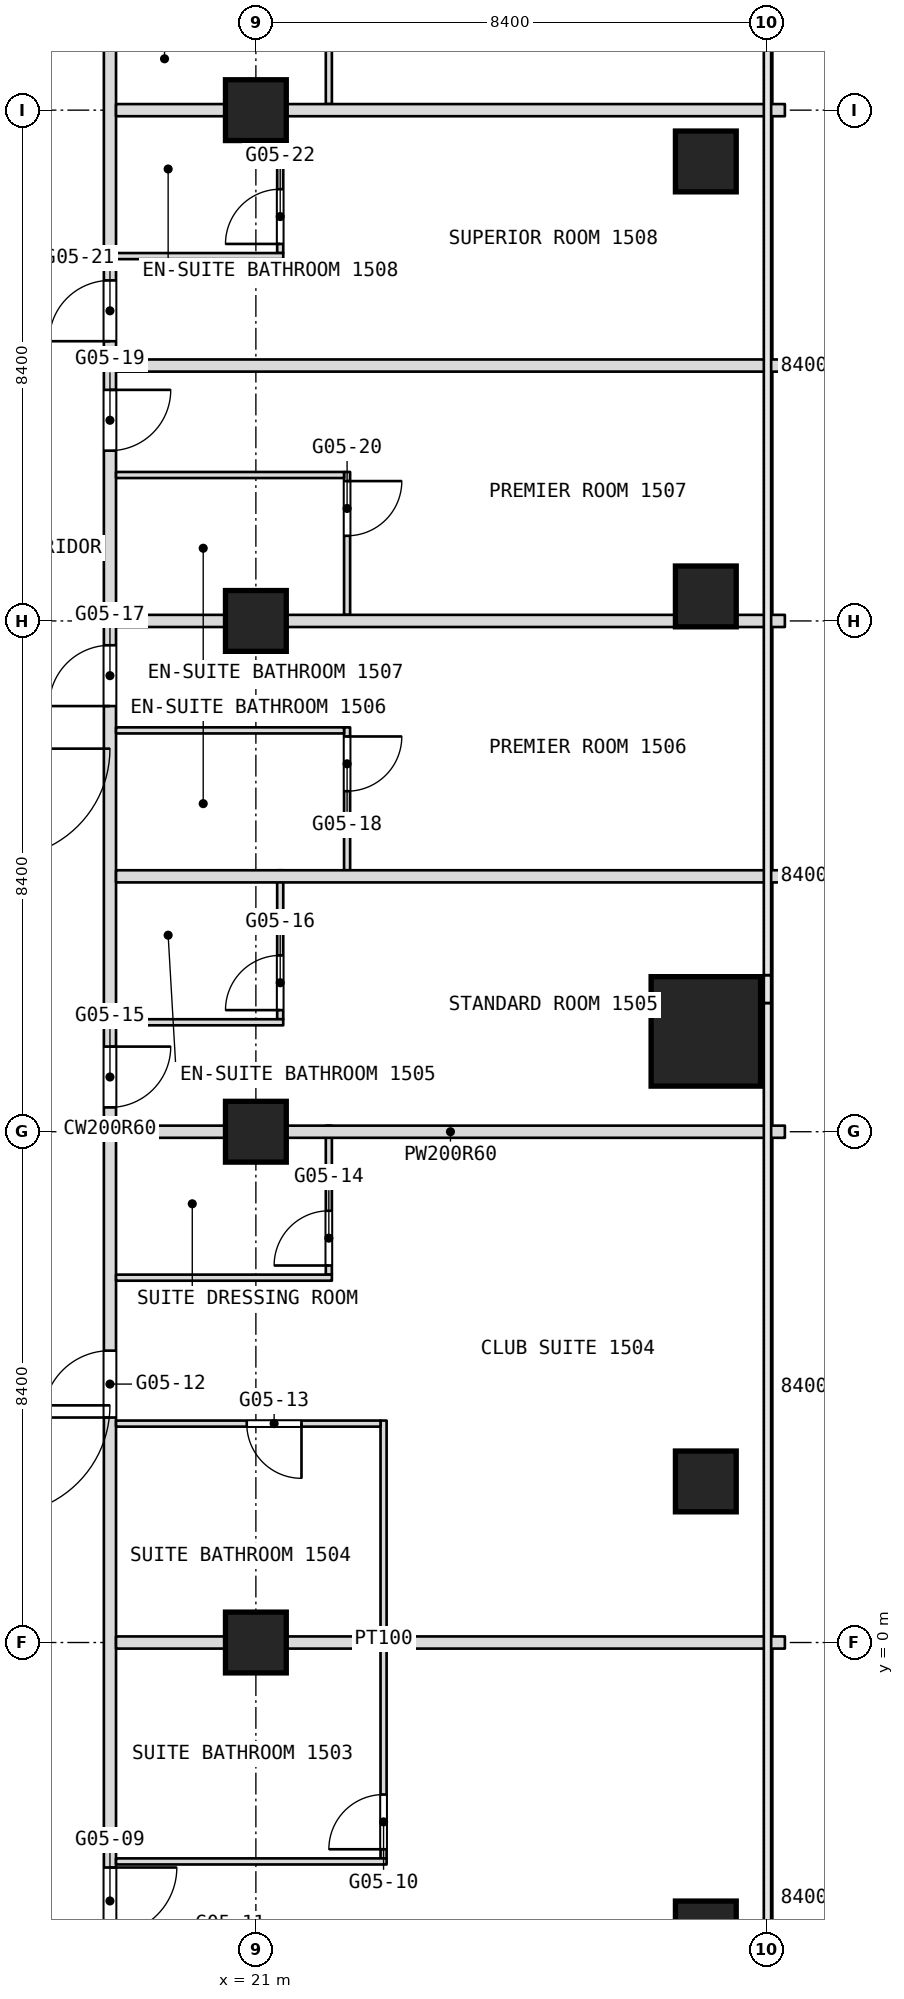
"""IFC4 building model, lengths in metres.
Left out: names, types, materials, properties, quantities, classifications, styles, units other than length and angle.
Written with IfcOpenShell. Run it as: python <this file> out.ifc"""

import sys

from ifc_helpers import new_model, si_unit, direction, frame, frame_2d, origin, origin_2d, place, context, subcontext, project, spatial, rectangle, extrude, element, fill, save


model = new_model("IFC4")
c1 = context("Model", 3, precision=1e-05, world=origin(), true_north=direction((0.0, 1.0)))
c2 = subcontext(c1, "Body", "Model", "MODEL_VIEW")
j1 = project(units=[si_unit("LENGTHUNIT", "METRE"), si_unit("PLANEANGLEUNIT", "RADIAN")], contexts=[c1])
p1 = place(None, origin())
s1 = spatial("IfcSite", under=j1, at=p1, CompositionType="ELEMENT")
p2 = place(p1, origin())
s2 = spatial("IfcBuilding", under=s1, at=p2, CompositionType="ELEMENT")
p3 = place(p2, frame((0.0, 0.0, 68.9)))
s3 = spatial("IfcBuildingStorey", under=s2, at=p3, CompositionType="ELEMENT", Elevation=68.9)
p4 = place(p3, frame((28.4, 10.05, 0.0), z_axis=(0.0, 0.0, 1.0), x_axis=(1.0, 0.0, 0.0)))
e1 = element("IfcColumn", 1, at=p4, inside=s3, PredefinedType="COLUMN", context=c2, shape_type="SweptSolid", body=[
    extrude(rectangle(XDim=1.8, YDim=1.8, at=origin_2d()), origin(), (0.0, 0.0, 1.0), 3.6),
])
for number, where, z_axis, x_axis in (
    (2, (21.0, 0.0, 0.0), (0.0, 0.0, 1.0), (1.0, 0.0, 0.0)),
    (3, (21.0, 8.4, 0.0), (0.0, 0.0, 1.0), (1.0, 0.0, 0.0)),
    (4, (21.0, 16.8, 0.0), (0.0, 0.0, 1.0), (1.0, 0.0, 0.0)),
    (5, (21.0, 25.2, 0.0), (0.0, 0.0, 1.0), (1.0, 0.0, 0.0)),
    (6, (28.4, 24.356, 0.0), (0.0, 0.0, 1.0), (1.0, 0.0, 0.0)),
    (7, (28.4, 17.203, 0.0), (0.0, 0.0, 1.0), (1.0, 0.0, 0.0)),
    (8, (28.4, 2.649, 0.0), (0.0, 0.0, 1.0), (1.0, 0.0, 0.0)),
    (9, (28.4, -4.752, 0.0), (0.0, 0.0, 1.0), (1.0, 0.0, 0.0)),
):
    element("IfcColumn", number, at=place(p3, frame(where, z_axis=z_axis, x_axis=x_axis)), inside=s3, PredefinedType="COLUMN", context=c2, shape_type="SweptSolid", body=[
        extrude(rectangle(XDim=1.0, YDim=1.0, at=origin_2d()), origin(), (0.0, 0.0, 1.0), 3.6),
    ])
p5 = place(p3, frame((23.1, -3.55, 0.0), z_axis=(0.0, 0.0, 1.0), x_axis=(0.0, 1.0, 0.0)))
e10 = element("IfcWall", 10, at=p5, inside=s3, PredefinedType="PARTITIONING", context=c2, shape_type="SweptSolid", body=[
    extrude(rectangle(XDim=7.2, YDim=0.1, at=frame_2d((3.6, 0.0))), origin(), (0.0, 0.0, 1.0), 3.34),
])
p6 = place(p5, frame((0.15, 0.0, 0.0)))
e11 = element("IfcOpeningElement", 11, at=p6, cuts=e10, PredefinedType="OPENING", context=c2, shape_type="SweptSolid", body=[
    extrude(rectangle(XDim=0.9, YDim=2.1, at=frame_2d((0.45, 1.05))), frame((0.0, 0.05, 0.0), z_axis=(0.0, -1.0, 0.0), x_axis=(1.0, 0.0, 0.0)), (0.0, 0.0, 1.0), 0.1),
])
p7 = place(p3, frame((22.5, 12.7, 0.0), z_axis=(0.0, 0.0, 1.0), x_axis=(0.0, 1.0, 0.0)))
e12 = element("IfcWall", 12, at=p7, inside=s3, PredefinedType="PARTITIONING", context=c2, shape_type="SweptSolid", body=[
    extrude(rectangle(XDim=2.35, YDim=0.1, at=frame_2d((1.175, 0.0))), origin(), (0.0, 0.0, 1.0), 3.34),
])
p8 = place(p7, frame((1.3, 0.0, 0.0)))
e13 = element("IfcOpeningElement", 13, at=p8, cuts=e12, PredefinedType="OPENING", context=c2, shape_type="SweptSolid", body=[
    extrude(rectangle(XDim=0.9, YDim=2.1, at=frame_2d((0.45, 1.05))), frame((0.0, 0.05, 0.0), z_axis=(0.0, -1.0, 0.0), x_axis=(1.0, 0.0, 0.0)), (0.0, 0.0, 1.0), 0.1),
])
p9 = place(p3, frame((22.5, 16.9, 0.0), z_axis=(0.0, 0.0, 1.0), x_axis=(0.0, 1.0, 0.0)))
e14 = element("IfcWall", 14, at=p9, inside=s3, PredefinedType="PARTITIONING", context=c2, shape_type="SweptSolid", body=[
    extrude(rectangle(XDim=2.35, YDim=0.1, at=frame_2d((1.175, 0.0))), origin(), (0.0, 0.0, 1.0), 3.34),
])
p10 = place(p9, frame((1.3, 0.0, 0.0)))
e15 = element("IfcOpeningElement", 15, at=p10, cuts=e14, PredefinedType="OPENING", context=c2, shape_type="SweptSolid", body=[
    extrude(rectangle(XDim=0.9, YDim=2.1, at=frame_2d((0.45, 1.05))), frame((0.0, 0.05, 0.0), z_axis=(0.0, -1.0, 0.0), x_axis=(1.0, 0.0, 0.0)), (0.0, 0.0, 1.0), 0.1),
])
p11 = place(p3, frame((22.2, 6.05, 0.0), z_axis=(0.0, 0.0, 1.0), x_axis=(0.0, 1.0, 0.0)))
e16 = element("IfcWall", 16, at=p11, inside=s3, PredefinedType="PARTITIONING", context=c2, shape_type="SweptSolid", body=[
    extrude(rectangle(XDim=2.45, YDim=0.1, at=frame_2d((1.225, 0.0))), origin(), (0.0, 0.0, 1.0), 3.34),
])
p12 = place(p11, frame((0.15, 0.0, 0.0)))
e17 = element("IfcOpeningElement", 17, at=p12, cuts=e16, PredefinedType="OPENING", context=c2, shape_type="SweptSolid", body=[
    extrude(rectangle(XDim=0.9, YDim=2.1, at=frame_2d((0.45, 1.05))), frame((0.0, 0.05, 0.0), z_axis=(0.0, -1.0, 0.0), x_axis=(1.0, 0.0, 0.0)), (0.0, 0.0, 1.0), 0.1),
])
p13 = place(p3, frame((22.2, 25.3, 0.0), z_axis=(0.0, 0.0, 1.0), x_axis=(0.0, 1.0, 0.0)))
e18 = element("IfcWall", 18, at=p13, inside=s3, PredefinedType="PARTITIONING", context=c2, shape_type="SweptSolid", body=[
    extrude(rectangle(XDim=2.35, YDim=0.1, at=frame_2d((1.175, 0.0))), origin(), (0.0, 0.0, 1.0), 3.34),
])
p14 = place(p3, frame((21.4, 10.25, 0.0), z_axis=(0.0, 0.0, 1.0), x_axis=(0.0, 1.0, 0.0)))
e19 = element("IfcWall", 19, at=p14, inside=s3, PredefinedType="PARTITIONING", context=c2, shape_type="SweptSolid", body=[
    extrude(rectangle(XDim=2.45, YDim=0.1, at=frame_2d((1.225, 0.0))), origin(), (0.0, 0.0, 1.0), 3.34),
])
p15 = place(p14, frame((0.15, 0.0, 0.0)))
e20 = element("IfcOpeningElement", 20, at=p15, cuts=e19, PredefinedType="OPENING", context=c2, shape_type="SweptSolid", body=[
    extrude(rectangle(XDim=0.9, YDim=2.1, at=frame_2d((0.45, 1.05))), frame((0.0, 0.05, 0.0), z_axis=(0.0, -1.0, 0.0), x_axis=(1.0, 0.0, 0.0)), (0.0, 0.0, 1.0), 0.1),
])
p16 = place(p3, frame((21.4, 22.85, 0.0), z_axis=(0.0, 0.0, 1.0), x_axis=(0.0, 1.0, 0.0)))
e21 = element("IfcWall", 21, at=p16, inside=s3, PredefinedType="PARTITIONING", context=c2, shape_type="SweptSolid", body=[
    extrude(rectangle(XDim=2.45, YDim=0.1, at=frame_2d((1.225, 0.0))), origin(), (0.0, 0.0, 1.0), 3.34),
])
p17 = place(p16, frame((0.15, 0.0, 0.0)))
e22 = element("IfcOpeningElement", 22, at=p17, cuts=e21, PredefinedType="OPENING", context=c2, shape_type="SweptSolid", body=[
    extrude(rectangle(XDim=0.9, YDim=2.1, at=frame_2d((0.45, 1.05))), frame((0.0, 0.05, 0.0), z_axis=(0.0, -1.0, 0.0), x_axis=(1.0, 0.0, 0.0)), (0.0, 0.0, 1.0), 0.1),
])
p18 = place(p3, frame((18.6, -16.665, 0.0), z_axis=(0.0, 0.0, 1.0), x_axis=(0.0, 1.0, 0.0)))
e23 = element("IfcWall", 23, at=p18, inside=s3, PredefinedType="PARTITIONING", context=c2, shape_type="SweptSolid", body=[
    extrude(rectangle(XDim=50.205, YDim=0.2, at=frame_2d((25.103, 0.0))), origin(), (0.0, 0.0, 1.0), 3.34),
])
p19 = place(p18, frame((2.991, 0.0, 0.0)))
e24 = element("IfcOpeningElement", 24, at=p19, cuts=e23, PredefinedType="OPENING", context=c2, shape_type="SweptSolid", body=[
    extrude(rectangle(XDim=1.0, YDim=2.1, at=frame_2d((0.5, 1.05))), frame((0.0, 0.1, 0.0), z_axis=(0.0, -1.0, 0.0), x_axis=(1.0, 0.0, 0.0)), (0.0, 0.0, 1.0), 0.2),
])
p20 = place(p18, frame((4.574, 0.0, 0.0)))
e25 = element("IfcOpeningElement", 25, at=p20, cuts=e23, PredefinedType="OPENING", context=c2, shape_type="SweptSolid", body=[
    extrude(rectangle(XDim=1.0, YDim=2.1, at=frame_2d((0.5, 1.05))), frame((0.0, 0.1, 0.0), z_axis=(0.0, -1.0, 0.0), x_axis=(1.0, 0.0, 0.0)), (0.0, 0.0, 1.0), 0.2),
])
p21 = place(p18, frame((11.865, 0.0, 0.0)))
e26 = element("IfcOpeningElement", 26, at=p21, cuts=e23, PredefinedType="OPENING", context=c2, shape_type="SweptSolid", body=[
    extrude(rectangle(XDim=1.1, YDim=2.1, at=frame_2d((0.55, 1.05))), frame((0.0, 0.1, 0.0), z_axis=(0.0, -1.0, 0.0), x_axis=(1.0, 0.0, 0.0)), (0.0, 0.0, 1.0), 0.2),
])
p22 = place(p18, frame((20.365, 0.0, 0.0)))
e27 = element("IfcOpeningElement", 27, at=p22, cuts=e23, PredefinedType="OPENING", context=c2, shape_type="SweptSolid", body=[
    extrude(rectangle(XDim=1.1, YDim=2.1, at=frame_2d((0.55, 1.05))), frame((0.0, 0.1, 0.0), z_axis=(0.0, -1.0, 0.0), x_axis=(1.0, 0.0, 0.0)), (0.0, 0.0, 1.0), 0.2),
])
p23 = place(p18, frame((25.465, 0.0, 0.0)))
e28 = element("IfcOpeningElement", 28, at=p23, cuts=e23, PredefinedType="OPENING", context=c2, shape_type="SweptSolid", body=[
    extrude(rectangle(XDim=1.0, YDim=2.1, at=frame_2d((0.5, 1.05))), frame((0.0, 0.1, 0.0), z_axis=(0.0, -1.0, 0.0), x_axis=(1.0, 0.0, 0.0)), (0.0, 0.0, 1.0), 0.2),
])
p24 = place(p18, frame((32.065, 0.0, 0.0)))
e29 = element("IfcOpeningElement", 29, at=p24, cuts=e23, PredefinedType="OPENING", context=c2, shape_type="SweptSolid", body=[
    extrude(rectangle(XDim=1.0, YDim=2.1, at=frame_2d((0.5, 1.05))), frame((0.0, 0.1, 0.0), z_axis=(0.0, -1.0, 0.0), x_axis=(1.0, 0.0, 0.0)), (0.0, 0.0, 1.0), 0.2),
])
p25 = place(p18, frame((36.265, 0.0, 0.0)))
e30 = element("IfcOpeningElement", 30, at=p25, cuts=e23, PredefinedType="OPENING", context=c2, shape_type="SweptSolid", body=[
    extrude(rectangle(XDim=1.0, YDim=2.1, at=frame_2d((0.5, 1.05))), frame((0.0, 0.1, 0.0), z_axis=(0.0, -1.0, 0.0), x_axis=(1.0, 0.0, 0.0)), (0.0, 0.0, 1.0), 0.2),
])
p26 = place(p18, frame((38.065, 0.0, 0.0)))
e31 = element("IfcOpeningElement", 31, at=p26, cuts=e23, PredefinedType="OPENING", context=c2, shape_type="SweptSolid", body=[
    extrude(rectangle(XDim=1.0, YDim=2.1, at=frame_2d((0.5, 1.05))), frame((0.0, 0.1, 0.0), z_axis=(0.0, -1.0, 0.0), x_axis=(1.0, 0.0, 0.0)), (0.0, 0.0, 1.0), 0.2),
])
p27 = place(p18, frame((45.465, 0.0, 0.0)))
e32 = element("IfcOpeningElement", 32, at=p27, cuts=e23, PredefinedType="OPENING", context=c2, shape_type="SweptSolid", body=[
    extrude(rectangle(XDim=1.1, YDim=2.1, at=frame_2d((0.55, 1.05))), frame((0.0, 0.1, 0.0), z_axis=(0.0, -1.0, 0.0), x_axis=(1.0, 0.0, 0.0)), (0.0, 0.0, 1.0), 0.2),
])
p28 = place(p3, frame((18.7, -3.6, 0.0), z_axis=(0.0, 0.0, 1.0), x_axis=(1.0, 0.0, 0.0)))
e33 = element("IfcWall", 33, at=p28, inside=s3, PredefinedType="PARTITIONING", context=c2, shape_type="SweptSolid", body=[
    extrude(rectangle(XDim=4.45, YDim=0.1, at=frame_2d((2.225, 0.0))), origin(), (0.0, 0.0, 1.0), 3.34),
])
p29 = place(p3, frame((18.7, 0.0, 0.0), z_axis=(0.0, 0.0, 1.0), x_axis=(1.0, 0.0, 0.0)))
e34 = element("IfcWall", 34, at=p29, inside=s3, PredefinedType="PARTITIONING", context=c2, shape_type="SweptSolid", body=[
    extrude(rectangle(XDim=11.0, YDim=0.2, at=frame_2d((5.5, 0.0))), origin(), (0.0, 0.0, 1.0), 2.84),
])
p30 = place(p3, frame((18.7, 3.6, 0.0), z_axis=(0.0, 0.0, 1.0), x_axis=(1.0, 0.0, 0.0)))
e35 = element("IfcWall", 35, at=p30, inside=s3, PredefinedType="PARTITIONING", context=c2, shape_type="SweptSolid", body=[
    extrude(rectangle(XDim=4.35, YDim=0.1, at=frame_2d((2.175, 0.0))), origin(), (0.0, 0.0, 1.0), 3.34),
])
p31 = place(p30, frame((2.15, 0.0, 0.0)))
e36 = element("IfcOpeningElement", 36, at=p31, cuts=e35, PredefinedType="OPENING", context=c2, shape_type="SweptSolid", body=[
    extrude(rectangle(XDim=0.9, YDim=2.1, at=frame_2d((0.45, 1.05))), frame((0.0, 0.05, 0.0), z_axis=(0.0, -1.0, 0.0), x_axis=(1.0, 0.0, 0.0)), (0.0, 0.0, 1.0), 0.1),
])
p32 = place(p3, frame((18.7, 6.0, 0.0), z_axis=(0.0, 0.0, 1.0), x_axis=(1.0, 0.0, 0.0)))
e37 = element("IfcWall", 37, at=p32, inside=s3, PredefinedType="PARTITIONING", context=c2, shape_type="SweptSolid", body=[
    extrude(rectangle(XDim=3.55, YDim=0.1, at=frame_2d((1.775, 0.0))), origin(), (0.0, 0.0, 1.0), 3.34),
])
p33 = place(p3, frame((18.7, 8.4, 0.0), z_axis=(0.0, 0.0, 1.0), x_axis=(1.0, 0.0, 0.0)))
e38 = element("IfcWall", 38, at=p33, inside=s3, PredefinedType="PARTITIONING", context=c2, shape_type="SweptSolid", body=[
    extrude(rectangle(XDim=11.0, YDim=0.2, at=frame_2d((5.5, 0.0))), origin(), (0.0, 0.0, 1.0), 2.84),
])
p34 = place(p3, frame((18.7, 10.2, 0.0), z_axis=(0.0, 0.0, 1.0), x_axis=(1.0, 0.0, 0.0)))
e39 = element("IfcWall", 39, at=p34, inside=s3, PredefinedType="PARTITIONING", context=c2, shape_type="SweptSolid", body=[
    extrude(rectangle(XDim=2.75, YDim=0.1, at=frame_2d((1.375, 0.0))), origin(), (0.0, 0.0, 1.0), 3.34),
])
p35 = place(p3, frame((18.7, 12.6, 0.0), z_axis=(0.0, 0.0, 1.0), x_axis=(1.0, 0.0, 0.0)))
e40 = element("IfcWall", 40, at=p35, inside=s3, PredefinedType="PARTITIONING", context=c2, shape_type="SweptSolid", body=[
    extrude(rectangle(XDim=11.0, YDim=0.2, at=frame_2d((5.5, 0.0))), origin(), (0.0, 0.0, 1.0), 3.34),
])
p36 = place(p3, frame((18.7, 15.0, 0.0), z_axis=(0.0, 0.0, 1.0), x_axis=(1.0, 0.0, 0.0)))
e41 = element("IfcWall", 41, at=p36, inside=s3, PredefinedType="PARTITIONING", context=c2, shape_type="SweptSolid", body=[
    extrude(rectangle(XDim=3.75, YDim=0.1, at=frame_2d((1.875, 0.0))), origin(), (0.0, 0.0, 1.0), 3.34),
])
p37 = place(p3, frame((18.7, 16.8, 0.0), z_axis=(0.0, 0.0, 1.0), x_axis=(1.0, 0.0, 0.0)))
e42 = element("IfcWall", 42, at=p37, inside=s3, PredefinedType="PARTITIONING", context=c2, shape_type="SweptSolid", body=[
    extrude(rectangle(XDim=11.0, YDim=0.2, at=frame_2d((5.5, 0.0))), origin(), (0.0, 0.0, 1.0), 2.84),
])
p38 = place(p3, frame((18.7, 19.2, 0.0), z_axis=(0.0, 0.0, 1.0), x_axis=(1.0, 0.0, 0.0)))
e43 = element("IfcWall", 43, at=p38, inside=s3, PredefinedType="PARTITIONING", context=c2, shape_type="SweptSolid", body=[
    extrude(rectangle(XDim=3.75, YDim=0.1, at=frame_2d((1.875, 0.0))), origin(), (0.0, 0.0, 1.0), 3.34),
])
p39 = place(p3, frame((18.7, 21.0, 0.0), z_axis=(0.0, 0.0, 1.0), x_axis=(1.0, 0.0, 0.0)))
e44 = element("IfcWall", 44, at=p39, inside=s3, PredefinedType="PARTITIONING", context=c2, shape_type="SweptSolid", body=[
    extrude(rectangle(XDim=11.0, YDim=0.2, at=frame_2d((5.5, 0.0))), origin(), (0.0, 0.0, 1.0), 3.34),
])
p40 = place(p3, frame((18.7, 22.8, 0.0), z_axis=(0.0, 0.0, 1.0), x_axis=(1.0, 0.0, 0.0)))
e45 = element("IfcWall", 45, at=p40, inside=s3, PredefinedType="PARTITIONING", context=c2, shape_type="SweptSolid", body=[
    extrude(rectangle(XDim=2.75, YDim=0.1, at=frame_2d((1.375, 0.0))), origin(), (0.0, 0.0, 1.0), 3.34),
])
p41 = place(p3, frame((18.7, 25.2, 0.0), z_axis=(0.0, 0.0, 1.0), x_axis=(1.0, 0.0, 0.0)))
e46 = element("IfcWall", 46, at=p41, inside=s3, PredefinedType="PARTITIONING", context=c2, shape_type="SweptSolid", body=[
    extrude(rectangle(XDim=11.0, YDim=0.2, at=frame_2d((5.5, 0.0))), origin(), (0.0, 0.0, 1.0), 2.84),
])
p42 = place(p6, origin())
e47 = element("IfcDoor", 47, at=p42, inside=s3, OperationType="SINGLE_SWING_LEFT", PredefinedType="DOOR", context=c2, shape_type="SweptSolid", body=[
    extrude(rectangle(XDim=0.9, YDim=2.1, at=frame_2d((0.45, 1.05))), frame((0.0, 0.025, 0.0), z_axis=(0.0, -1.0, 0.0), x_axis=(1.0, 0.0, 0.0)), (0.0, 0.0, 1.0), 0.05),
])
fill(e11, e47)
p43 = place(p8, origin())
e48 = element("IfcDoor", 48, at=p43, inside=s3, OperationType="SINGLE_SWING_RIGHT", PredefinedType="DOOR", context=c2, shape_type="SweptSolid", body=[
    extrude(rectangle(XDim=0.9, YDim=2.1, at=frame_2d((0.45, 1.05))), frame((0.0, 0.025, 0.0), z_axis=(0.0, -1.0, 0.0), x_axis=(1.0, 0.0, 0.0)), (0.0, 0.0, 1.0), 0.05),
])
fill(e13, e48)
p44 = place(p10, origin())
e49 = element("IfcDoor", 49, at=p44, inside=s3, OperationType="SINGLE_SWING_RIGHT", PredefinedType="DOOR", context=c2, shape_type="SweptSolid", body=[
    extrude(rectangle(XDim=0.9, YDim=2.1, at=frame_2d((0.45, 1.05))), frame((0.0, 0.025, 0.0), z_axis=(0.0, -1.0, 0.0), x_axis=(1.0, 0.0, 0.0)), (0.0, 0.0, 1.0), 0.05),
])
fill(e15, e49)
p45 = place(p12, origin())
e50 = element("IfcDoor", 50, at=p45, inside=s3, OperationType="SINGLE_SWING_LEFT", PredefinedType="DOOR", context=c2, shape_type="SweptSolid", body=[
    extrude(rectangle(XDim=0.9, YDim=2.1, at=frame_2d((0.45, 1.05))), frame((0.0, 0.025, 0.0), z_axis=(0.0, -1.0, 0.0), x_axis=(1.0, 0.0, 0.0)), (0.0, 0.0, 1.0), 0.05),
])
fill(e17, e50)
p46 = place(p15, origin())
e51 = element("IfcDoor", 51, at=p46, inside=s3, OperationType="SINGLE_SWING_LEFT", PredefinedType="DOOR", context=c2, shape_type="SweptSolid", body=[
    extrude(rectangle(XDim=0.9, YDim=2.1, at=frame_2d((0.45, 1.05))), frame((0.0, 0.025, 0.0), z_axis=(0.0, -1.0, 0.0), x_axis=(1.0, 0.0, 0.0)), (0.0, 0.0, 1.0), 0.05),
])
fill(e20, e51)
p47 = place(p17, origin())
e52 = element("IfcDoor", 52, at=p47, inside=s3, OperationType="SINGLE_SWING_LEFT", PredefinedType="DOOR", context=c2, shape_type="SweptSolid", body=[
    extrude(rectangle(XDim=0.9, YDim=2.1, at=frame_2d((0.45, 1.05))), frame((0.0, 0.025, 0.0), z_axis=(0.0, -1.0, 0.0), x_axis=(1.0, 0.0, 0.0)), (0.0, 0.0, 1.0), 0.05),
])
fill(e22, e52)
p48 = place(p21, origin())
e53 = element("IfcDoor", 53, at=p48, inside=s3, OperationType="SINGLE_SWING_LEFT", PredefinedType="DOOR", context=c2, shape_type="SweptSolid", body=[
    extrude(rectangle(XDim=1.1, YDim=2.1, at=frame_2d((0.55, 1.05))), frame((0.0, 0.025, 0.0), z_axis=(0.0, -1.0, 0.0), x_axis=(1.0, 0.0, 0.0)), (0.0, 0.0, 1.0), 0.05),
])
fill(e26, e53)
p49 = place(p22, origin())
e54 = element("IfcDoor", 54, at=p49, inside=s3, OperationType="SINGLE_SWING_RIGHT", PredefinedType="DOOR", context=c2, shape_type="SweptSolid", body=[
    extrude(rectangle(XDim=1.1, YDim=2.1, at=frame_2d((0.55, 1.05))), frame((0.0, 0.025, 0.0), z_axis=(0.0, -1.0, 0.0), x_axis=(1.0, 0.0, 0.0)), (0.0, 0.0, 1.0), 0.05),
])
fill(e27, e54)
p50 = place(p23, origin())
e55 = element("IfcDoor", 55, at=p50, inside=s3, OperationType="SINGLE_SWING_LEFT", PredefinedType="DOOR", context=c2, shape_type="SweptSolid", body=[
    extrude(rectangle(XDim=1.0, YDim=2.1, at=frame_2d((0.5, 1.05))), frame((0.0, 0.025, 0.0), z_axis=(0.0, -1.0, 0.0), x_axis=(1.0, 0.0, 0.0)), (0.0, 0.0, 1.0), 0.05),
])
fill(e28, e55)
p51 = place(p24, origin())
e56 = element("IfcDoor", 56, at=p51, inside=s3, OperationType="SINGLE_SWING_LEFT", PredefinedType="DOOR", context=c2, shape_type="SweptSolid", body=[
    extrude(rectangle(XDim=1.0, YDim=2.1, at=frame_2d((0.5, 1.05))), frame((0.0, 0.025, 0.0), z_axis=(0.0, -1.0, 0.0), x_axis=(1.0, 0.0, 0.0)), (0.0, 0.0, 1.0), 0.05),
])
fill(e29, e56)
p52 = place(p25, origin())
e57 = element("IfcDoor", 57, at=p52, inside=s3, OperationType="SINGLE_SWING_LEFT", PredefinedType="DOOR", context=c2, shape_type="SweptSolid", body=[
    extrude(rectangle(XDim=1.0, YDim=2.1, at=frame_2d((0.5, 1.05))), frame((0.0, 0.025, 0.0), z_axis=(0.0, -1.0, 0.0), x_axis=(1.0, 0.0, 0.0)), (0.0, 0.0, 1.0), 0.05),
])
fill(e30, e57)
p53 = place(p26, origin())
e58 = element("IfcDoor", 58, at=p53, inside=s3, OperationType="SINGLE_SWING_LEFT", PredefinedType="DOOR", context=c2, shape_type="SweptSolid", body=[
    extrude(rectangle(XDim=1.0, YDim=2.1, at=frame_2d((0.5, 1.05))), frame((0.0, 0.025, 0.0), z_axis=(0.0, -1.0, 0.0), x_axis=(1.0, 0.0, 0.0)), (0.0, 0.0, 1.0), 0.05),
])
fill(e31, e58)
p54 = place(p31, origin())
e59 = element("IfcDoor", 59, at=p54, inside=s3, OperationType="SINGLE_SWING_LEFT", PredefinedType="DOOR", context=c2, shape_type="SweptSolid", body=[
    extrude(rectangle(XDim=0.9, YDim=2.1, at=frame_2d((0.45, 1.05))), frame((0.0, 0.025, 0.0), z_axis=(0.0, -1.0, 0.0), x_axis=(1.0, 0.0, 0.0)), (0.0, 0.0, 1.0), 0.05),
])
fill(e36, e59)
save(model, sys.argv[1])
